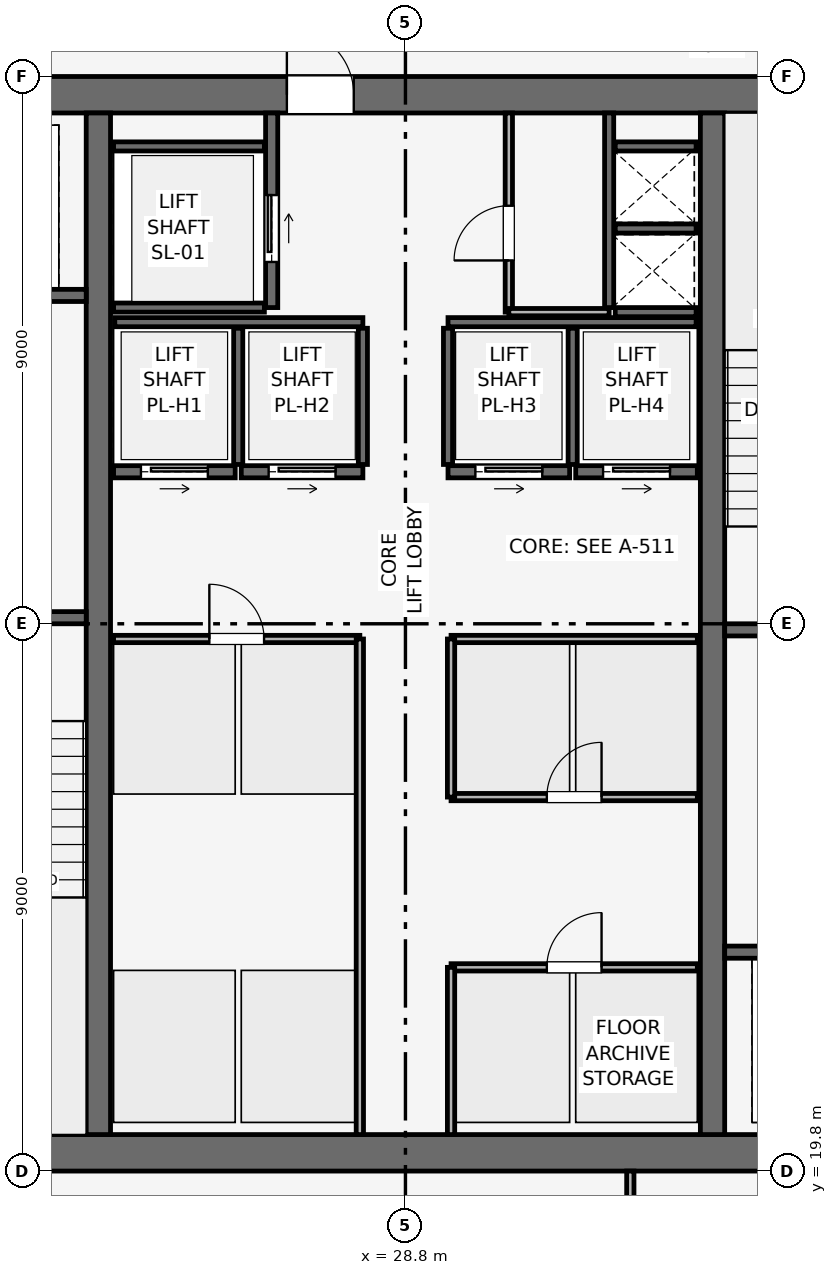
"""IFC4 building model, lengths in metres.
Left out: names, types, materials, properties, quantities, classifications, styles, units other than length and angle.
Written with IfcOpenShell. Run it as: python <this file> out.ifc"""

import sys

from ifc_helpers import new_model, si_unit, direction, frame, frame_2d, origin, place, context, subcontext, project, spatial, rectangle, extrude, element, fill, save


model = new_model("IFC4")
c1 = context("Model", 3, precision=1e-05, world=origin(), true_north=direction((0.0, 1.0)))
c2 = subcontext(c1, "Body", "Model", "MODEL_VIEW")
j1 = project(units=[si_unit("LENGTHUNIT", "METRE"), si_unit("PLANEANGLEUNIT", "RADIAN")], contexts=[c1])
p1 = place(None, origin())
s1 = spatial("IfcSite", under=j1, at=p1, CompositionType="ELEMENT")
p2 = place(p1, origin())
s2 = spatial("IfcBuilding", under=s1, at=p2, CompositionType="ELEMENT")
p3 = place(p2, frame((0.0, 0.0, 325.5)))
s3 = spatial("IfcBuildingStorey", under=s2, at=p3, CompositionType="ELEMENT", Elevation=325.5)
p4 = place(p3, frame((19.8, 20.1, 0.0), z_axis=(0.0, 0.0, 1.0), x_axis=(1.0, 0.0, 0.0)))
e1 = element("IfcWall", 1, at=p4, inside=s3, PredefinedType="SHEAR", context=c2, shape_type="SweptSolid", body=[
    extrude(rectangle(XDim=18.0, YDim=0.6, at=frame_2d((9.0, 0.0))), origin(), (0.0, 0.0, 1.0), 3.75),
])
p5 = place(p3, frame((19.8, 37.5, 0.0), z_axis=(0.0, 0.0, 1.0), x_axis=(1.0, 0.0, 0.0)))
e2 = element("IfcWall", 2, at=p5, inside=s3, PredefinedType="SHEAR", context=c2, shape_type="SweptSolid", body=[
    extrude(rectangle(XDim=18.0, YDim=0.6, at=frame_2d((9.0, 0.0))), origin(), (0.0, 0.0, 1.0), 3.75),
])
p6 = place(p5, frame((7.05, 0.0, 0.0)))
e3 = element("IfcOpeningElement", 3, at=p6, cuts=e2, PredefinedType="OPENING", context=c2, shape_type="SweptSolid", body=[
    extrude(rectangle(XDim=1.1, YDim=2.15, at=frame_2d((0.55, 1.075))), frame((0.0, 0.31, 0.0), z_axis=(0.0, -1.0, 0.0), x_axis=(1.0, 0.0, 0.0)), (0.0, 0.0, 1.0), 0.62),
])
for number, where, z_axis, x_axis in (
    (4, (23.75, 20.4, 0.0), (0.0, 0.0, 1.0), (0.0, 1.0, 0.0)),
    (5, (33.85, 20.4, 0.0), (0.0, 0.0, 1.0), (0.0, 1.0, 0.0)),
):
    element("IfcWall", number, at=place(p3, frame(where, z_axis=z_axis, x_axis=x_axis)), inside=s3, PredefinedType="SHEAR", context=c2, shape_type="SweptSolid", body=[
        extrude(rectangle(XDim=16.8, YDim=0.4, at=frame_2d((8.4, 0.0))), origin(), (0.0, 0.0, 1.0), 3.75),
    ])
p7 = place(p3, frame((20.4, 28.9, 0.0), z_axis=(0.0, 0.0, 1.0), x_axis=(1.0, 0.0, 0.0)))
e6 = element("IfcWall", 6, at=p7, inside=s3, PredefinedType="SHEAR", context=c2, shape_type="SweptSolid", body=[
    extrude(rectangle(XDim=3.15, YDim=0.2, at=frame_2d((1.575, 0.0))), origin(), (0.0, 0.0, 1.0), 3.51),
])
p8 = place(p7, frame((0.8, 0.0, 0.0)))
e7 = element("IfcOpeningElement", 7, at=p8, cuts=e6, PredefinedType="OPENING", context=c2, shape_type="SweptSolid", body=[
    extrude(rectangle(XDim=1.0, YDim=2.1, at=frame_2d((0.5, 1.05))), frame((0.0, 0.11, 0.0), z_axis=(0.0, -1.0, 0.0), x_axis=(1.0, 0.0, 0.0)), (0.0, 0.0, 1.0), 0.22),
])
p9 = place(p3, frame((34.05, 28.7, 0.0), z_axis=(0.0, 0.0, 1.0), x_axis=(1.0, 0.0, 0.0)))
e8 = element("IfcWall", 8, at=p9, inside=s3, PredefinedType="SHEAR", context=c2, shape_type="SweptSolid", body=[
    extrude(rectangle(XDim=3.15, YDim=0.2, at=frame_2d((1.575, 0.0))), origin(), (0.0, 0.0, 1.0), 3.51),
])
p10 = place(p9, frame((0.8, 0.0, 0.0)))
e9 = element("IfcOpeningElement", 9, at=p10, cuts=e8, PredefinedType="OPENING", context=c2, shape_type="SweptSolid", body=[
    extrude(rectangle(XDim=1.0, YDim=2.1, at=frame_2d((0.5, 1.05))), frame((0.0, 0.11, 0.0), z_axis=(0.0, -1.0, 0.0), x_axis=(1.0, 0.0, 0.0)), (0.0, 0.0, 1.0), 0.22),
])
p11 = place(p3, frame((32.15, 34.0, 0.0), z_axis=(0.0, 0.0, 1.0), x_axis=(0.0, 1.0, 0.0)))
e10 = element("IfcWall", 10, at=p11, inside=s3, PredefinedType="SHEAR", context=c2, shape_type="SweptSolid", body=[
    extrude(rectangle(XDim=3.2, YDim=0.15, at=frame_2d((1.6, 0.0))), origin(), (0.0, 0.0, 1.0), 3.51),
])
for number, where, z_axis, x_axis in (
    (11, (32.25, 33.925, 0.0), (0.0, 0.0, 1.0), (1.0, 0.0, 0.0)),
    (12, (32.25, 35.3, 0.0), (0.0, 0.0, 1.0), (1.0, 0.0, 0.0)),
):
    element("IfcWall", number, at=place(p3, frame(where, z_axis=z_axis, x_axis=x_axis)), inside=s3, PredefinedType="SHEAR", context=c2, shape_type="SweptSolid", body=[
        extrude(rectangle(XDim=1.33, YDim=0.15, at=frame_2d((0.665, 0.0))), origin(), (0.0, 0.0, 1.0), 3.51),
    ])
p12 = place(p3, frame((20.5, 34.2, 0.0), z_axis=(0.0, 0.0, 1.0), x_axis=(1.0, 0.0, 0.0)))
e13 = element("IfcWall", 13, at=p12, inside=s3, PredefinedType="SHEAR", context=c2, shape_type="SweptSolid", body=[
    extrude(rectangle(XDim=3.05, YDim=0.2, at=frame_2d((1.525, 0.0))), origin(), (0.0, 0.0, 1.0), 3.51),
])
p13 = place(p12, frame((0.75, 0.0, 0.0)))
e14 = element("IfcOpeningElement", 14, at=p13, cuts=e13, PredefinedType="OPENING", context=c2, shape_type="SweptSolid", body=[
    extrude(rectangle(XDim=1.1, YDim=2.15, at=frame_2d((0.55, 1.075))), frame((0.0, 0.11, 0.0), z_axis=(0.0, -1.0, 0.0), x_axis=(1.0, 0.0, 0.0)), (0.0, 0.0, 1.0), 0.22),
])
p14 = place(p3, frame((34.05, 23.4, 0.0), z_axis=(0.0, 0.0, 1.0), x_axis=(1.0, 0.0, 0.0)))
e15 = element("IfcWall", 15, at=p14, inside=s3, PredefinedType="SHEAR", context=c2, shape_type="SweptSolid", body=[
    extrude(rectangle(XDim=3.05, YDim=0.2, at=frame_2d((1.525, 0.0))), origin(), (0.0, 0.0, 1.0), 3.51),
])
p15 = place(p14, frame((1.2, 0.0, 0.0)))
e16 = element("IfcOpeningElement", 16, at=p15, cuts=e15, PredefinedType="OPENING", context=c2, shape_type="SweptSolid", body=[
    extrude(rectangle(XDim=1.1, YDim=2.15, at=frame_2d((0.55, 1.075))), frame((0.0, 0.11, 0.0), z_axis=(0.0, -1.0, 0.0), x_axis=(1.0, 0.0, 0.0)), (0.0, 0.0, 1.0), 0.22),
])
p16 = place(p3, frame((26.6, 34.0, 0.0), z_axis=(0.0, 0.0, 1.0), x_axis=(0.0, 1.0, 0.0)))
e17 = element("IfcWall", 17, at=p16, inside=s3, PredefinedType="SHEAR", context=c2, shape_type="SweptSolid", body=[
    extrude(rectangle(XDim=3.2, YDim=0.2, at=frame_2d((1.6, 0.0))), origin(), (0.0, 0.0, 1.0), 3.51),
])
p17 = place(p16, frame((0.75, 0.0, 0.0)))
e18 = element("IfcOpeningElement", 18, at=p17, cuts=e17, PredefinedType="OPENING", context=c2, shape_type="SweptSolid", body=[
    extrude(rectangle(XDim=1.1, YDim=2.15, at=frame_2d((0.55, 1.075))), frame((0.0, 0.11, 0.0), z_axis=(0.0, -1.0, 0.0), x_axis=(1.0, 0.0, 0.0)), (0.0, 0.0, 1.0), 0.22),
])
for number, where, z_axis, x_axis in (
    (19, (24.0, 34.0, 0.0), (0.0, 0.0, 1.0), (1.0, 0.0, 0.0)),
    (20, (24.0, 36.65, 0.0), (0.0, 0.0, 1.0), (1.0, 0.0, 0.0)),
):
    element("IfcWall", number, at=place(p3, frame(where, z_axis=z_axis, x_axis=x_axis)), inside=s3, PredefinedType="SHEAR", context=c2, shape_type="SweptSolid", body=[
        extrude(rectangle(XDim=2.48, YDim=0.15, at=frame_2d((1.24, 0.0))), origin(), (0.0, 0.0, 1.0), 3.51),
    ])
p18 = place(p3, frame((24.0, 31.3, 0.0), z_axis=(0.0, 0.0, 1.0), x_axis=(1.0, 0.0, 0.0)))
e21 = element("IfcWall", 21, at=p18, inside=s3, PredefinedType="SHEAR", context=c2, shape_type="SweptSolid", body=[
    extrude(rectangle(XDim=2.0, YDim=0.2, at=frame_2d((1.0, 0.0))), origin(), (0.0, 0.0, 1.0), 3.51),
])
p19 = place(p18, frame((0.45, 0.0, 0.0)))
e22 = element("IfcOpeningElement", 22, at=p19, cuts=e21, PredefinedType="OPENING", context=c2, shape_type="SweptSolid", body=[
    extrude(rectangle(XDim=1.1, YDim=2.15, at=frame_2d((0.55, 1.075))), frame((0.0, 0.11, 0.0), z_axis=(0.0, -1.0, 0.0), x_axis=(1.0, 0.0, 0.0)), (0.0, 0.0, 1.0), 0.22),
])
p20 = place(p3, frame((26.1, 31.3, 0.0), z_axis=(0.0, 0.0, 1.0), x_axis=(1.0, 0.0, 0.0)))
e23 = element("IfcWall", 23, at=p20, inside=s3, PredefinedType="SHEAR", context=c2, shape_type="SweptSolid", body=[
    extrude(rectangle(XDim=2.0, YDim=0.2, at=frame_2d((1.0, 0.0))), origin(), (0.0, 0.0, 1.0), 3.51),
])
p21 = place(p20, frame((0.45, 0.0, 0.0)))
e24 = element("IfcOpeningElement", 24, at=p21, cuts=e23, PredefinedType="OPENING", context=c2, shape_type="SweptSolid", body=[
    extrude(rectangle(XDim=1.1, YDim=2.15, at=frame_2d((0.55, 1.075))), frame((0.0, 0.11, 0.0), z_axis=(0.0, -1.0, 0.0), x_axis=(1.0, 0.0, 0.0)), (0.0, 0.0, 1.0), 0.22),
])
p22 = place(p3, frame((29.5, 31.3, 0.0), z_axis=(0.0, 0.0, 1.0), x_axis=(1.0, 0.0, 0.0)))
e25 = element("IfcWall", 25, at=p22, inside=s3, PredefinedType="SHEAR", context=c2, shape_type="SweptSolid", body=[
    extrude(rectangle(XDim=2.0, YDim=0.2, at=frame_2d((1.0, 0.0))), origin(), (0.0, 0.0, 1.0), 3.51),
])
p23 = place(p22, frame((0.45, 0.0, 0.0)))
e26 = element("IfcOpeningElement", 26, at=p23, cuts=e25, PredefinedType="OPENING", context=c2, shape_type="SweptSolid", body=[
    extrude(rectangle(XDim=1.1, YDim=2.15, at=frame_2d((0.55, 1.075))), frame((0.0, 0.11, 0.0), z_axis=(0.0, -1.0, 0.0), x_axis=(1.0, 0.0, 0.0)), (0.0, 0.0, 1.0), 0.22),
])
p24 = place(p3, frame((31.6, 31.3, 0.0), z_axis=(0.0, 0.0, 1.0), x_axis=(1.0, 0.0, 0.0)))
e27 = element("IfcWall", 27, at=p24, inside=s3, PredefinedType="SHEAR", context=c2, shape_type="SweptSolid", body=[
    extrude(rectangle(XDim=2.0, YDim=0.2, at=frame_2d((1.0, 0.0))), origin(), (0.0, 0.0, 1.0), 3.51),
])
p25 = place(p24, frame((0.45, 0.0, 0.0)))
e28 = element("IfcOpeningElement", 28, at=p25, cuts=e27, PredefinedType="OPENING", context=c2, shape_type="SweptSolid", body=[
    extrude(rectangle(XDim=1.1, YDim=2.15, at=frame_2d((0.55, 1.075))), frame((0.0, 0.11, 0.0), z_axis=(0.0, -1.0, 0.0), x_axis=(1.0, 0.0, 0.0)), (0.0, 0.0, 1.0), 0.22),
])
p26 = place(p3, frame((32.25, 36.65, 0.0), z_axis=(0.0, 0.0, 1.0), x_axis=(1.0, 0.0, 0.0)))
e29 = element("IfcWall", 29, at=p26, inside=s3, PredefinedType="SHEAR", context=c2, shape_type="SweptSolid", body=[
    extrude(rectangle(XDim=1.33, YDim=0.15, at=frame_2d((0.665, 0.0))), origin(), (0.0, 0.0, 1.0), 3.51),
])
for number, where, z_axis, x_axis in (
    (30, (24.02, 33.76, 0.0), (0.0, 0.0, 1.0), (1.0, 0.0, 0.0)),
    (31, (29.5, 33.76, 0.0), (0.0, 0.0, 1.0), (1.0, 0.0, 0.0)),
):
    element("IfcWall", number, at=place(p3, frame(where, z_axis=z_axis, x_axis=x_axis)), inside=s3, PredefinedType="SHEAR", context=c2, shape_type="SweptSolid", body=[
        extrude(rectangle(XDim=4.08, YDim=0.15, at=frame_2d((2.04, 0.0))), origin(), (0.0, 0.0, 1.0), 3.51),
    ])
for number, where, z_axis, x_axis in (
    (32, (26.05, 31.42, 0.0), (0.0, 0.0, 1.0), (0.0, 1.0, 0.0)),
    (33, (28.1, 31.42, 0.0), (0.0, 0.0, 1.0), (0.0, 1.0, 0.0)),
    (34, (29.5, 31.42, 0.0), (0.0, 0.0, 1.0), (0.0, 1.0, 0.0)),
    (35, (31.55, 31.42, 0.0), (0.0, 0.0, 1.0), (0.0, 1.0, 0.0)),
):
    element("IfcWall", number, at=place(p3, frame(where, z_axis=z_axis, x_axis=x_axis)), inside=s3, PredefinedType="SHEAR", context=c2, shape_type="SweptSolid", body=[
        extrude(rectangle(XDim=2.24, YDim=0.15, at=frame_2d((1.12, 0.0))), origin(), (0.0, 0.0, 1.0), 3.51),
    ])
p27 = place(p3, frame((30.5, 33.925, 0.0), z_axis=(0.0, 0.0, 1.0), x_axis=(0.0, 1.0, 0.0)))
e36 = element("IfcWall", 36, at=p27, inside=s3, PredefinedType="PARTITIONING", context=c2, shape_type="SweptSolid", body=[
    extrude(rectangle(XDim=3.275, YDim=0.12, at=frame_2d((1.637, 0.0))), origin(), (0.0, 0.0, 1.0), 3.51),
])
p28 = place(p27, frame((0.85, 0.0, 0.0)))
e37 = element("IfcOpeningElement", 37, at=p28, cuts=e36, PredefinedType="OPENING", context=c2, shape_type="SweptSolid", body=[
    extrude(rectangle(XDim=0.9, YDim=2.1, at=frame_2d((0.45, 1.05))), frame((0.0, 0.07, 0.0), z_axis=(0.0, -1.0, 0.0), x_axis=(1.0, 0.0, 0.0)), (0.0, 0.0, 1.0), 0.14),
])
p29 = place(p3, frame((30.5, 33.925, 0.0), z_axis=(0.0, 0.0, 1.0), x_axis=(1.0, 0.0, 0.0)))
e38 = element("IfcWall", 38, at=p29, inside=s3, PredefinedType="PARTITIONING", context=c2, shape_type="SweptSolid", body=[
    extrude(rectangle(XDim=1.65, YDim=0.12, at=frame_2d((0.825, 0.0))), origin(), (0.0, 0.0, 1.0), 3.51),
])
p30 = place(p3, frame((24.0, 28.55, 0.0), z_axis=(0.0, 0.0, 1.0), x_axis=(1.0, 0.0, 0.0)))
e39 = element("IfcWall", 39, at=p30, inside=s3, PredefinedType="PARTITIONING", context=c2, shape_type="SweptSolid", body=[
    extrude(rectangle(XDim=4.05, YDim=0.12, at=frame_2d((2.025, 0.0))), origin(), (0.0, 0.0, 1.0), 3.51),
])
p31 = place(p30, frame((1.575, 0.0, 0.0)))
e40 = element("IfcOpeningElement", 40, at=p31, cuts=e39, PredefinedType="OPENING", context=c2, shape_type="SweptSolid", body=[
    extrude(rectangle(XDim=0.9, YDim=2.1, at=frame_2d((0.45, 1.05))), frame((0.0, 0.07, 0.0), z_axis=(0.0, -1.0, 0.0), x_axis=(1.0, 0.0, 0.0)), (0.0, 0.0, 1.0), 0.14),
])
p32 = place(p3, frame((28.05, 20.4, 0.0), z_axis=(0.0, 0.0, 1.0), x_axis=(0.0, 1.0, 0.0)))
e41 = element("IfcWall", 41, at=p32, inside=s3, PredefinedType="PARTITIONING", context=c2, shape_type="SweptSolid", body=[
    extrude(rectangle(XDim=8.15, YDim=0.12, at=frame_2d((4.075, 0.0))), origin(), (0.0, 0.0, 1.0), 3.51),
])
p33 = place(p3, frame((29.55, 23.15, 0.0), z_axis=(0.0, 0.0, 1.0), x_axis=(1.0, 0.0, 0.0)))
e42 = element("IfcWall", 42, at=p33, inside=s3, PredefinedType="PARTITIONING", context=c2, shape_type="SweptSolid", body=[
    extrude(rectangle(XDim=4.05, YDim=0.12, at=frame_2d((2.025, 0.0))), origin(), (0.0, 0.0, 1.0), 3.51),
])
p34 = place(p33, frame((1.575, 0.0, 0.0)))
e43 = element("IfcOpeningElement", 43, at=p34, cuts=e42, PredefinedType="OPENING", context=c2, shape_type="SweptSolid", body=[
    extrude(rectangle(XDim=0.9, YDim=2.1, at=frame_2d((0.45, 1.05))), frame((0.0, 0.07, 0.0), z_axis=(0.0, -1.0, 0.0), x_axis=(1.0, 0.0, 0.0)), (0.0, 0.0, 1.0), 0.14),
])
p35 = place(p3, frame((29.55, 20.4, 0.0), z_axis=(0.0, 0.0, 1.0), x_axis=(0.0, 1.0, 0.0)))
e44 = element("IfcWall", 44, at=p35, inside=s3, PredefinedType="PARTITIONING", context=c2, shape_type="SweptSolid", body=[
    extrude(rectangle(XDim=2.75, YDim=0.12, at=frame_2d((1.375, 0.0))), origin(), (0.0, 0.0, 1.0), 3.51),
])
p36 = place(p3, frame((29.55, 25.95, 0.0), z_axis=(0.0, 0.0, 1.0), x_axis=(1.0, 0.0, 0.0)))
e45 = element("IfcWall", 45, at=p36, inside=s3, PredefinedType="PARTITIONING", context=c2, shape_type="SweptSolid", body=[
    extrude(rectangle(XDim=4.05, YDim=0.12, at=frame_2d((2.025, 0.0))), origin(), (0.0, 0.0, 1.0), 3.51),
])
p37 = place(p36, frame((1.575, 0.0, 0.0)))
e46 = element("IfcOpeningElement", 46, at=p37, cuts=e45, PredefinedType="OPENING", context=c2, shape_type="SweptSolid", body=[
    extrude(rectangle(XDim=0.9, YDim=2.1, at=frame_2d((0.45, 1.05))), frame((0.0, 0.07, 0.0), z_axis=(0.0, -1.0, 0.0), x_axis=(1.0, 0.0, 0.0)), (0.0, 0.0, 1.0), 0.14),
])
p38 = place(p3, frame((29.55, 28.55, 0.0), z_axis=(0.0, 0.0, 1.0), x_axis=(1.0, 0.0, 0.0)))
e47 = element("IfcWall", 47, at=p38, inside=s3, PredefinedType="PARTITIONING", context=c2, shape_type="SweptSolid", body=[
    extrude(rectangle(XDim=4.05, YDim=0.12, at=frame_2d((2.025, 0.0))), origin(), (0.0, 0.0, 1.0), 3.51),
])
p39 = place(p3, frame((29.55, 25.95, 0.0), z_axis=(0.0, 0.0, 1.0), x_axis=(0.0, 1.0, 0.0)))
e48 = element("IfcWall", 48, at=p39, inside=s3, PredefinedType="PARTITIONING", context=c2, shape_type="SweptSolid", body=[
    extrude(rectangle(XDim=2.6, YDim=0.12, at=frame_2d((1.3, 0.0))), origin(), (0.0, 0.0, 1.0), 3.51),
])
p40 = place(p3, frame((32.498, 6.13, 0.0), z_axis=(0.0, 0.0, 1.0), x_axis=(0.0, 1.0, 0.0)))
e49 = element("IfcWall", 49, at=p40, inside=s3, PredefinedType="PARTITIONING", context=c2, shape_type="SweptSolid", body=[
    extrude(rectangle(XDim=13.67, YDim=0.12, at=frame_2d((6.835, 0.0))), origin(), (0.0, 0.0, 1.0), 3.135),
])
p41 = place(p40, frame((11.27, 0.0, 0.0)))
e50 = element("IfcOpeningElement", 50, at=p41, cuts=e49, PredefinedType="OPENING", context=c2, shape_type="SweptSolid", body=[
    extrude(rectangle(XDim=0.9, YDim=2.1, at=frame_2d((0.45, 1.05))), frame((0.0, 0.07, 0.0), z_axis=(0.0, -1.0, 0.0), x_axis=(1.0, 0.0, 0.0)), (0.0, 0.0, 1.0), 0.14),
])
p42 = place(p17, origin())
e51 = element("IfcDoor", 51, at=p42, inside=s3, OperationType="SLIDING_TO_RIGHT", PredefinedType="DOOR", context=c2, shape_type="SweptSolid", body=[
    extrude(rectangle(XDim=1.1, YDim=2.15, at=frame_2d((0.55, 1.075))), frame((0.0, 0.025, 0.0), z_axis=(0.0, -1.0, 0.0), x_axis=(1.0, 0.0, 0.0)), (0.0, 0.0, 1.0), 0.05),
])
fill(e18, e51)
p43 = place(p19, origin())
e52 = element("IfcDoor", 52, at=p43, inside=s3, OperationType="SLIDING_TO_RIGHT", PredefinedType="DOOR", context=c2, shape_type="SweptSolid", body=[
    extrude(rectangle(XDim=1.1, YDim=2.15, at=frame_2d((0.55, 1.075))), frame((0.0, 0.025, 0.0), z_axis=(0.0, -1.0, 0.0), x_axis=(1.0, 0.0, 0.0)), (0.0, 0.0, 1.0), 0.05),
])
fill(e22, e52)
p44 = place(p21, origin())
e53 = element("IfcDoor", 53, at=p44, inside=s3, OperationType="SLIDING_TO_RIGHT", PredefinedType="DOOR", context=c2, shape_type="SweptSolid", body=[
    extrude(rectangle(XDim=1.1, YDim=2.15, at=frame_2d((0.55, 1.075))), frame((0.0, 0.025, 0.0), z_axis=(0.0, -1.0, 0.0), x_axis=(1.0, 0.0, 0.0)), (0.0, 0.0, 1.0), 0.05),
])
fill(e24, e53)
p45 = place(p23, origin())
e54 = element("IfcDoor", 54, at=p45, inside=s3, OperationType="SLIDING_TO_RIGHT", PredefinedType="DOOR", context=c2, shape_type="SweptSolid", body=[
    extrude(rectangle(XDim=1.1, YDim=2.15, at=frame_2d((0.55, 1.075))), frame((0.0, 0.025, 0.0), z_axis=(0.0, -1.0, 0.0), x_axis=(1.0, 0.0, 0.0)), (0.0, 0.0, 1.0), 0.05),
])
fill(e26, e54)
p46 = place(p25, origin())
e55 = element("IfcDoor", 55, at=p46, inside=s3, OperationType="SLIDING_TO_RIGHT", PredefinedType="DOOR", context=c2, shape_type="SweptSolid", body=[
    extrude(rectangle(XDim=1.1, YDim=2.15, at=frame_2d((0.55, 1.075))), frame((0.0, 0.025, 0.0), z_axis=(0.0, -1.0, 0.0), x_axis=(1.0, 0.0, 0.0)), (0.0, 0.0, 1.0), 0.05),
])
fill(e28, e55)
p47 = place(p28, origin())
e56 = element("IfcDoor", 56, at=p47, inside=s3, OperationType="SINGLE_SWING_LEFT", PredefinedType="DOOR", context=c2, shape_type="SweptSolid", body=[
    extrude(rectangle(XDim=0.9, YDim=2.1, at=frame_2d((0.45, 1.05))), frame((0.0, 0.025, 0.0), z_axis=(0.0, -1.0, 0.0), x_axis=(1.0, 0.0, 0.0)), (0.0, 0.0, 1.0), 0.05),
])
fill(e37, e56)
p48 = place(p31, origin())
e57 = element("IfcDoor", 57, at=p48, inside=s3, OperationType="SINGLE_SWING_LEFT", PredefinedType="DOOR", context=c2, shape_type="SweptSolid", body=[
    extrude(rectangle(XDim=0.9, YDim=2.1, at=frame_2d((0.45, 1.05))), frame((0.0, 0.025, 0.0), z_axis=(0.0, -1.0, 0.0), x_axis=(1.0, 0.0, 0.0)), (0.0, 0.0, 1.0), 0.05),
])
fill(e40, e57)
p49 = place(p34, origin())
e58 = element("IfcDoor", 58, at=p49, inside=s3, OperationType="SINGLE_SWING_RIGHT", PredefinedType="DOOR", context=c2, shape_type="SweptSolid", body=[
    extrude(rectangle(XDim=0.9, YDim=2.1, at=frame_2d((0.45, 1.05))), frame((0.0, 0.025, 0.0), z_axis=(0.0, -1.0, 0.0), x_axis=(1.0, 0.0, 0.0)), (0.0, 0.0, 1.0), 0.05),
])
fill(e43, e58)
p50 = place(p37, origin())
e59 = element("IfcDoor", 59, at=p50, inside=s3, OperationType="SINGLE_SWING_RIGHT", PredefinedType="DOOR", context=c2, shape_type="SweptSolid", body=[
    extrude(rectangle(XDim=0.9, YDim=2.1, at=frame_2d((0.45, 1.05))), frame((0.0, 0.025, 0.0), z_axis=(0.0, -1.0, 0.0), x_axis=(1.0, 0.0, 0.0)), (0.0, 0.0, 1.0), 0.05),
])
fill(e46, e59)
p51 = place(p6, origin())
e60 = element("IfcDoor", 60, at=p51, inside=s3, OperationType="SINGLE_SWING_LEFT", PredefinedType="DOOR", context=c2, shape_type="SweptSolid", body=[
    extrude(rectangle(XDim=1.1, YDim=2.15, at=frame_2d((0.55, 1.075))), frame((0.0, 0.025, 0.0), z_axis=(0.0, -1.0, 0.0), x_axis=(1.0, 0.0, 0.0)), (0.0, 0.0, 1.0), 0.05),
])
fill(e3, e60)
save(model, sys.argv[1])
